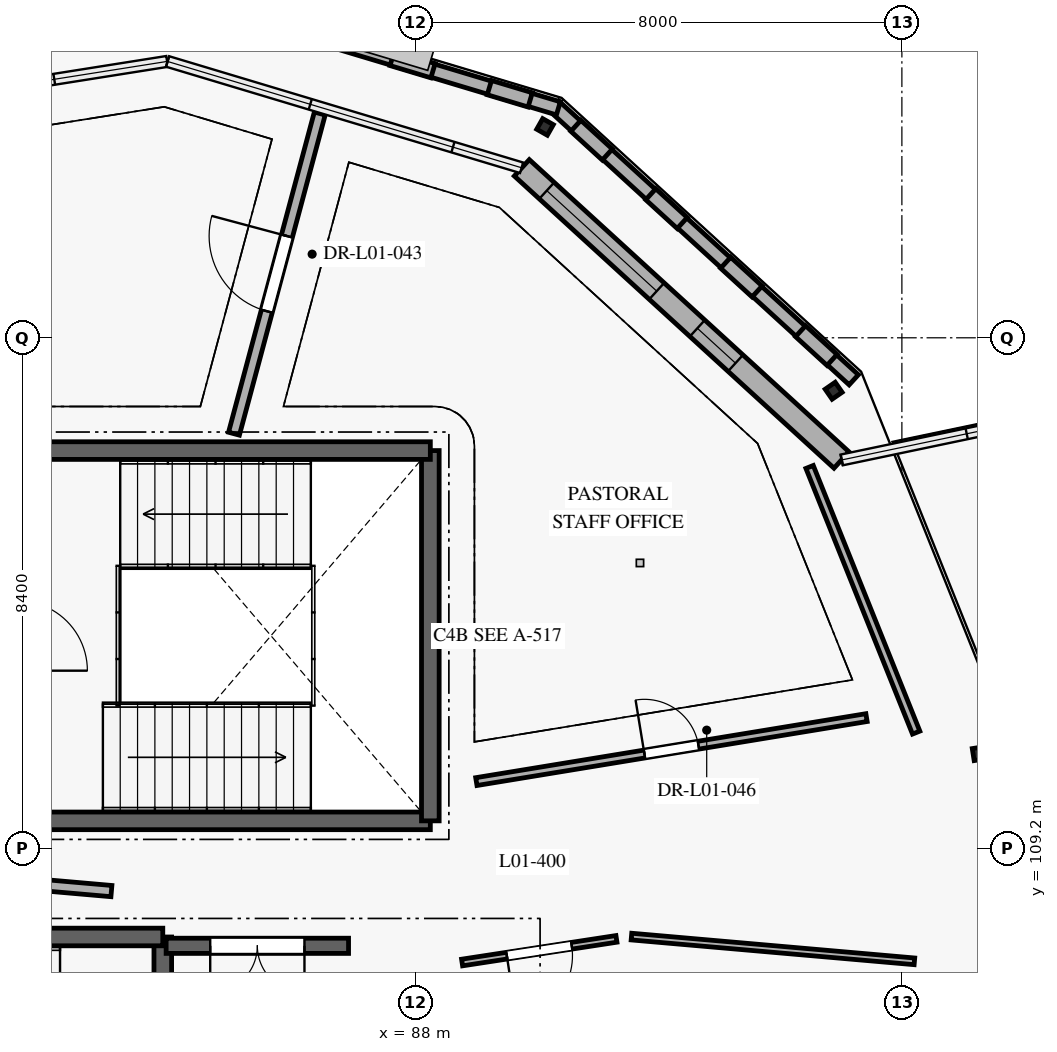
"""IFC4 building model, lengths in metres.
Left out: names, types, materials, properties, quantities, classifications, styles, units other than length and angle.
Written with IfcOpenShell. Run it as: python <this file> out.ifc"""

import sys

from ifc_helpers import new_model, si_unit, direction, frame, frame_2d, origin, origin_2d, place, context, subcontext, project, spatial, rectangle, hollow_rectangle, extrude, element, fill, save


model = new_model("IFC4")
c1 = context("Model", 3, precision=1e-05, world=origin(), true_north=direction((0.0, 1.0)))
c2 = subcontext(c1, "Body", "Model", "MODEL_VIEW")
j1 = project(units=[si_unit("LENGTHUNIT", "METRE"), si_unit("PLANEANGLEUNIT", "RADIAN")], contexts=[c1])
p1 = place(None, origin())
s1 = spatial("IfcSite", under=j1, at=p1, CompositionType="ELEMENT")
p2 = place(p1, origin())
s2 = spatial("IfcBuilding", under=s1, at=p2, CompositionType="ELEMENT")
p3 = place(p2, frame((0.0, 0.0, 4.2)))
s3 = spatial("IfcBuildingStorey", under=s2, at=p3, CompositionType="ELEMENT", Elevation=4.2)
for number, where, z_axis, x_axis in (
    (1, (97.272, 110.76, 0.0), (0.0, 0.0, 1.0), (-0.156, 0.988, 0.0)),
    (2, (94.878, 116.729, 0.0), (0.0, 0.0, 1.0), (-0.569, 0.822, 0.0)),
    (3, (90.131, 121.068, 0.0), (0.0, 0.0, 1.0), (-0.87, 0.493, 0.0)),
):
    element("IfcColumn", number, at=place(p3, frame(where, z_axis=z_axis, x_axis=x_axis)), inside=s3, PredefinedType="COLUMN", context=c2, shape_type="SweptSolid", body=[
        extrude(hollow_rectangle(XDim=0.2, YDim=0.2, WallThickness=0.012, InnerFilletRadius=0.012, OuterFilletRadius=0.019, at=origin_2d()), origin(), (0.0, 0.0, 1.0), 4.2),
    ])
p4 = place(p3, frame((89.75, 120.396, 0.0), z_axis=(0.0, 0.0, 1.0), x_axis=(0.738102453677, -0.674688645136, 0.0)))
e4 = element("IfcWall", 4, at=p4, inside=s3, PredefinedType="SOLIDWALL", context=c2, shape_type="SweptSolid", body=[
    extrude(rectangle(XDim=7.122, YDim=0.365, at=frame_2d((3.561, 0.0))), origin(), (0.0, 0.0, 1.0), 3.94),
])
p5 = place(p4, frame((0.556, 0.0, 0.85)))
e5 = element("IfcOpeningElement", 5, at=p5, cuts=e4, PredefinedType="OPENING", context=c2, shape_type="SweptSolid", body=[
    extrude(rectangle(XDim=2.45, YDim=1.4, at=frame_2d((1.225, 0.7))), frame((0.0, 0.192, 0.0), z_axis=(0.0, -1.0, 0.0), x_axis=(1.0, 0.0, 0.0)), (0.0, 0.0, 1.0), 0.385),
])
p6 = place(p4, frame((3.911, 0.0, 0.85)))
e6 = element("IfcOpeningElement", 6, at=p6, cuts=e4, PredefinedType="OPENING", context=c2, shape_type="SweptSolid", body=[
    extrude(rectangle(XDim=0.85, YDim=1.4, at=frame_2d((0.425, 0.7))), frame((0.0, 0.192, 0.0), z_axis=(0.0, -1.0, 0.0), x_axis=(1.0, 0.0, 0.0)), (0.0, 0.0, 1.0), 0.385),
])
p7 = place(p3, frame((95.208, 116.909, 0.0), z_axis=(0.0, 0.0, 1.0), x_axis=(-0.738121953815, 0.674667311566, 0.0)))
e7 = element("IfcWall", 7, at=p7, inside=s3, PredefinedType="ELEMENTEDWALL", context=c2, shape_type="SweptSolid", body=[
    extrude(rectangle(XDim=6.675, YDim=0.225, at=frame_2d((3.338, 0.0))), origin(), (0.0, 0.0, 1.0), 1.09),
])
for number, where, z_axis, x_axis in (
    (8, (94.851, 117.236, 1.09), (0.0, 0.0, 1.0), (-0.738, 0.675, 0.0)),
    (9, (93.619, 118.362, 1.09), (0.0, 0.0, 1.0), (-0.738, 0.675, 0.0)),
    (10, (92.388, 119.488, 1.09), (0.0, 0.0, 1.0), (-0.738, 0.675, 0.0)),
    (11, (91.156, 120.614, 1.09), (0.0, 0.0, 1.0), (-0.738, 0.675, 0.0)),
):
    element("IfcWall", number, at=place(p3, frame(where, z_axis=z_axis, x_axis=x_axis)), inside=s3, PredefinedType="ELEMENTEDWALL", context=c2, shape_type="SweptSolid", body=[
        extrude(rectangle(XDim=0.701, YDim=0.245, at=frame_2d((0.351, 0.0))), origin(), (0.0, 0.0, 1.0), 2.85),
    ])
p8 = place(p3, frame((90.351, 121.374, 0.0), z_axis=(0.0, 0.0, 1.0), x_axis=(-0.957749751871, 0.287602873404, 0.0)))
e12 = element("IfcWall", 12, at=p8, inside=s3, PredefinedType="ELEMENTEDWALL", context=c2, shape_type="SweptSolid", body=[
    extrude(rectangle(XDim=6.676, YDim=0.225, at=frame_2d((3.338, 0.0))), origin(), (0.0, 0.0, 1.0), 1.09),
])
for number, where, z_axis, x_axis in (
    (13, (89.887, 121.513, 1.09), (0.0, 0.0, 1.0), (-0.958, 0.288, 0.0)),
    (14, (88.289, 121.993, 1.09), (0.0, 0.0, 1.0), (-0.958, 0.288, 0.0)),
):
    element("IfcWall", number, at=place(p3, frame(where, z_axis=z_axis, x_axis=x_axis)), inside=s3, PredefinedType="ELEMENTEDWALL", context=c2, shape_type="SweptSolid", body=[
        extrude(rectangle(XDim=0.701, YDim=0.245, at=frame_2d((0.351, 0.0))), origin(), (0.0, 0.0, 1.0), 2.85),
    ])
p9 = place(p3, frame((84.037, 123.288, 0.0), z_axis=(0.0, 0.0, 1.0), x_axis=(-0.987690206406, -0.156422684322, 0.0)))
e15 = element("IfcWall", 15, at=p9, inside=s3, PredefinedType="ELEMENTEDWALL", context=c2, shape_type="SweptSolid", body=[
    extrude(rectangle(XDim=6.676, YDim=0.225, at=frame_2d((3.338, 0.0))), origin(), (0.0, 0.0, 1.0), 1.09),
])
p10 = place(p3, frame((83.845, 101.655, 0.0), z_axis=(0.0, 0.0, 1.0), x_axis=(0.0, 1.0, 0.0)))
e16 = element("IfcWall", 16, at=p10, inside=s3, PredefinedType="SHEAR", context=c2, shape_type="SweptSolid", body=[
    extrude(rectangle(XDim=6.09, YDim=0.29, at=frame_2d((3.045, 0.0))), origin(), (0.0, 0.0, 1.0), 3.95),
])
p11 = place(p10, frame((2.47, 0.0, 0.0)))
e17 = element("IfcOpeningElement", 17, at=p11, cuts=e16, PredefinedType="OPENING", context=c2, shape_type="SweptSolid", body=[
    extrude(rectangle(XDim=1.15, YDim=2.1, at=frame_2d((0.575, 1.05))), frame((0.0, 0.155, 0.0), z_axis=(0.0, -1.0, 0.0), x_axis=(1.0, 0.0, 0.0)), (0.0, 0.0, 1.0), 0.31),
])
p12 = place(p3, frame((83.845, 107.745, 0.0), z_axis=(0.0, 0.0, 1.0), x_axis=(-1.0, 0.0, 0.0)))
e18 = element("IfcWall", 18, at=p12, inside=s3, PredefinedType="SHEAR", context=c2, shape_type="SweptSolid", body=[
    extrude(rectangle(XDim=6.79, YDim=0.29, at=frame_2d((3.395, 0.0))), origin(), (0.0, 0.0, 1.0), 3.95),
])
p13 = place(p3, frame((86.9, 107.6, 0.0), z_axis=(0.0, 0.0, 1.0), x_axis=(-1.0, 0.0, 0.0)))
e19 = element("IfcWall", 19, at=p13, inside=s3, PredefinedType="SHEAR", context=c2, shape_type="SweptSolid", body=[
    extrude(rectangle(XDim=3.0, YDim=0.25, at=frame_2d((1.5, 0.0))), origin(), (0.0, 0.0, 1.0), 3.95),
])
p14 = place(p13, frame((0.725, 0.0, 0.0)))
e20 = element("IfcOpeningElement", 20, at=p14, cuts=e19, PredefinedType="OPENING", context=c2, shape_type="SweptSolid", body=[
    extrude(rectangle(XDim=1.55, YDim=2.15, at=frame_2d((0.775, 1.075))), frame((0.0, 0.135, 0.0), z_axis=(0.0, -1.0, 0.0), x_axis=(1.0, 0.0, 0.0)), (0.0, 0.0, 1.0), 0.27),
])
p15 = place(p3, frame((81.455, 109.655, 0.0), z_axis=(0.0, 0.0, 1.0), x_axis=(1.0, 0.0, 0.0)))
e21 = element("IfcWall", 21, at=p15, inside=s3, PredefinedType="SHEAR", context=c2, shape_type="SweptSolid", body=[
    extrude(rectangle(XDim=6.79, YDim=0.29, at=frame_2d((3.395, 0.0))), origin(), (0.0, 0.0, 1.0), 3.95),
])
p16 = place(p3, frame((88.245, 109.655, 0.0), z_axis=(0.0, 0.0, 1.0), x_axis=(0.0, 1.0, 0.0)))
e22 = element("IfcWall", 22, at=p16, inside=s3, PredefinedType="SHEAR", context=c2, shape_type="SweptSolid", body=[
    extrude(rectangle(XDim=6.09, YDim=0.29, at=frame_2d((3.045, 0.0))), origin(), (0.0, 0.0, 1.0), 3.95),
])
p17 = place(p3, frame((88.245, 115.745, 0.0), z_axis=(0.0, 0.0, 1.0), x_axis=(-1.0, 0.0, 0.0)))
e23 = element("IfcWall", 23, at=p17, inside=s3, PredefinedType="SHEAR", context=c2, shape_type="SweptSolid", body=[
    extrude(rectangle(XDim=6.79, YDim=0.29, at=frame_2d((3.395, 0.0))), origin(), (0.0, 0.0, 1.0), 3.95),
])
p18 = place(p3, frame((81.431, 108.637, 0.0), z_axis=(0.0, 0.0, 1.0), x_axis=(0.996196241539, -0.08713809926, 0.0)))
e24 = element("IfcWall", 24, at=p18, inside=s3, PredefinedType="PARTITIONING", context=c2, shape_type="SweptSolid", body=[
    extrude(rectangle(XDim=1.575, YDim=0.185, at=frame_2d((0.787, 0.0))), origin(), (0.0, 0.0, 1.0), 3.93),
])
p19 = place(p3, frame((85.016, 116.022, 0.0), z_axis=(0.0, 0.0, 1.0), x_axis=(0.25882188484, 0.965925065379, 0.0)))
e25 = element("IfcWall", 25, at=p19, inside=s3, PredefinedType="PARTITIONING", context=c2, shape_type="SweptSolid", body=[
    extrude(rectangle(XDim=5.452, YDim=0.185, at=frame_2d((2.726, 0.0))), origin(), (0.0, 0.0, 1.0), 3.93),
])
p20 = place(p19, frame((2.086, 0.0, 0.0)))
e26 = element("IfcOpeningElement", 26, at=p20, cuts=e25, PredefinedType="OPENING", context=c2, shape_type="SweptSolid", body=[
    extrude(rectangle(XDim=1.28, YDim=2.14, at=frame_2d((0.64, 1.07))), frame((0.0, 0.103, 0.0), z_axis=(0.0, -1.0, 0.0), x_axis=(1.0, 0.0, 0.0)), (0.0, 0.0, 1.0), 0.205),
])
p21 = place(p3, frame((96.206, 107.344, 0.0), z_axis=(0.0, 0.0, 1.0), x_axis=(-0.996193377134, 0.087170840051, 0.0)))
e27 = element("IfcWall", 27, at=p21, inside=s3, PredefinedType="PARTITIONING", context=c2, shape_type="SweptSolid", body=[
    extrude(rectangle(XDim=4.672, YDim=0.11, at=frame_2d((2.336, 0.0))), origin(), (0.0, 0.0, 1.0), 3.93),
])
p22 = place(p3, frame((91.306, 107.714, 0.0), z_axis=(0.0, 0.0, 1.0), x_axis=(-0.988481340726, -0.151342786539, 0.0)))
e28 = element("IfcWall", 28, at=p22, inside=s3, PredefinedType="PARTITIONING", context=c2, shape_type="SweptSolid", body=[
    extrude(rectangle(XDim=2.568, YDim=0.11, at=frame_2d((1.284, 0.0))), origin(), (0.0, 0.0, 1.0), 3.93),
])
p23 = place(p22, frame((0.744, 0.0, 0.0)))
e29 = element("IfcOpeningElement", 29, at=p23, cuts=e28, PredefinedType="OPENING", context=c2, shape_type="SweptSolid", body=[
    extrude(rectangle(XDim=1.08, YDim=2.12, at=frame_2d((0.54, 1.06))), frame((0.0, 0.065, 0.0), z_axis=(0.0, -1.0, 0.0), x_axis=(1.0, 0.0, 0.0)), (0.0, 0.0, 1.0), 0.13),
])
p24 = place(p3, frame((89.002, 110.301, 0.0), z_axis=(0.0, 0.0, 1.0), x_axis=(0.986819802975, 0.161822978763, 0.0)))
e30 = element("IfcWall", 30, at=p24, inside=s3, PredefinedType="PARTITIONING", context=c2, shape_type="SweptSolid", body=[
    extrude(rectangle(XDim=6.502, YDim=0.13, at=frame_2d((3.251, 0.0))), origin(), (0.0, 0.0, 1.0), 3.93),
])
p25 = place(p24, frame((2.801, 0.0, 0.0)))
e31 = element("IfcOpeningElement", 31, at=p25, cuts=e30, PredefinedType="OPENING", context=c2, shape_type="SweptSolid", body=[
    extrude(rectangle(XDim=0.9, YDim=2.05, at=frame_2d((0.45, 1.025))), frame((0.0, 0.075, 0.0), z_axis=(0.0, -1.0, 0.0), x_axis=(1.0, 0.0, 0.0)), (0.0, 0.0, 1.0), 0.15),
])
p26 = place(p3, frame((96.235, 111.106, 0.0), z_axis=(0.0, 0.0, 1.0), x_axis=(-0.37231147683, 0.928107840835, 0.0)))
e32 = element("IfcWall", 32, at=p26, inside=s3, PredefinedType="PARTITIONING", context=c2, shape_type="SweptSolid", body=[
    extrude(rectangle(XDim=4.708, YDim=0.13, at=frame_2d((2.354, 0.0))), origin(), (0.0, 0.0, 1.0), 3.93),
])
p27 = place(p5, origin())
e33 = element("IfcWindow", 33, at=p27, inside=s3, PartitioningType="SINGLE_PANEL", PredefinedType="WINDOW", context=c2, shape_type="SweptSolid", body=[
    extrude(rectangle(XDim=2.45, YDim=1.4, at=frame_2d((1.225, 0.7))), frame((0.0, 0.03, 0.0), z_axis=(0.0, -1.0, 0.0), x_axis=(1.0, 0.0, 0.0)), (0.0, 0.0, 1.0), 0.06),
])
fill(e5, e33)
p28 = place(p6, origin())
e34 = element("IfcWindow", 34, at=p28, inside=s3, PartitioningType="SINGLE_PANEL", PredefinedType="WINDOW", context=c2, shape_type="SweptSolid", body=[
    extrude(rectangle(XDim=0.85, YDim=1.4, at=frame_2d((0.425, 0.7))), frame((0.0, 0.03, 0.0), z_axis=(0.0, -1.0, 0.0), x_axis=(1.0, 0.0, 0.0)), (0.0, 0.0, 1.0), 0.06),
])
fill(e6, e34)
p29 = place(p14, origin())
e35 = element("IfcDoor", 35, at=p29, inside=s3, OperationType="DOUBLE_DOOR_SINGLE_SWING", PredefinedType="DOOR", context=c2, shape_type="SweptSolid", body=[
    extrude(rectangle(XDim=1.55, YDim=2.15, at=frame_2d((0.775, 1.075))), frame((0.0, 0.025, 0.0), z_axis=(0.0, -1.0, 0.0), x_axis=(1.0, 0.0, 0.0)), (0.0, 0.0, 1.0), 0.05),
])
fill(e20, e35)
p30 = place(p20, origin())
e36 = element("IfcDoor", 36, at=p30, inside=s3, OperationType="SINGLE_SWING_RIGHT", PredefinedType="DOOR", context=c2, shape_type="SweptSolid", body=[
    extrude(rectangle(XDim=1.28, YDim=2.14, at=frame_2d((0.64, 1.07))), frame((0.0, 0.025, 0.0), z_axis=(0.0, -1.0, 0.0), x_axis=(1.0, 0.0, 0.0)), (0.0, 0.0, 1.0), 0.05),
])
fill(e26, e36)
p31 = place(p23, origin())
e37 = element("IfcDoor", 37, at=p31, inside=s3, OperationType="SINGLE_SWING_RIGHT", PredefinedType="DOOR", context=c2, shape_type="SweptSolid", body=[
    extrude(rectangle(XDim=1.08, YDim=2.12, at=frame_2d((0.54, 1.06))), frame((0.0, 0.025, 0.0), z_axis=(0.0, -1.0, 0.0), x_axis=(1.0, 0.0, 0.0)), (0.0, 0.0, 1.0), 0.05),
])
fill(e29, e37)
p32 = place(p25, origin())
e38 = element("IfcDoor", 38, at=p32, inside=s3, OperationType="SINGLE_SWING_LEFT", PredefinedType="DOOR", context=c2, shape_type="SweptSolid", body=[
    extrude(rectangle(XDim=0.9, YDim=2.05, at=frame_2d((0.45, 1.025))), frame((0.0, 0.025, 0.0), z_axis=(0.0, -1.0, 0.0), x_axis=(1.0, 0.0, 0.0)), (0.0, 0.0, 1.0), 0.05),
])
fill(e31, e38)
save(model, sys.argv[1])
